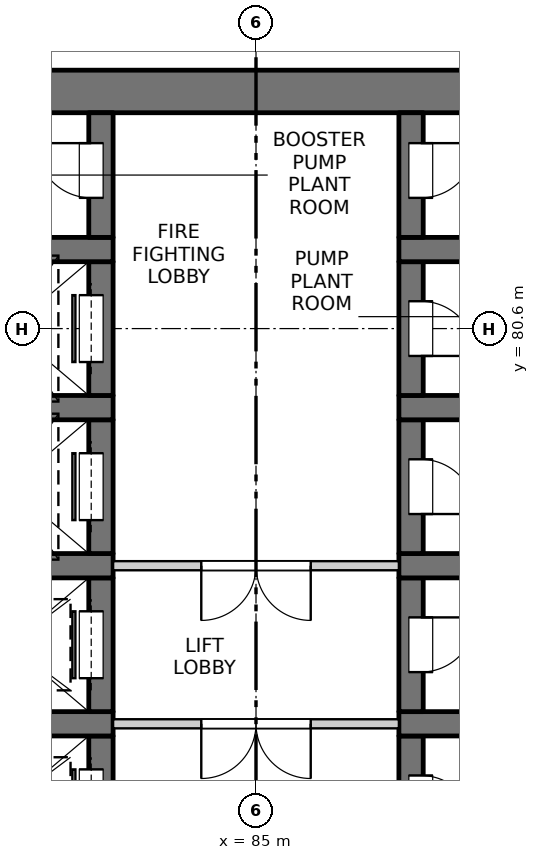
"""IFC4 building model, lengths in metres.
Left out: names, types, materials, properties, quantities, classifications, styles, units other than length and angle.
Written with IfcOpenShell. Run it as: python <this file> out.ifc"""

import sys

from ifc_helpers import new_model, si_unit, direction, frame, frame_2d, origin, place, context, subcontext, project, spatial, rectangle, extrude, element, fill, save


model = new_model("IFC4")
c1 = context("Model", 3, precision=1e-05, world=origin(), true_north=direction((0.0, 1.0)))
c2 = subcontext(c1, "Body", "Model", "MODEL_VIEW")
j1 = project(units=[si_unit("LENGTHUNIT", "METRE"), si_unit("PLANEANGLEUNIT", "RADIAN")], contexts=[c1])
p1 = place(None, origin())
s1 = spatial("IfcSite", under=j1, at=p1, CompositionType="ELEMENT")
p2 = place(p1, origin())
s2 = spatial("IfcBuilding", under=s1, at=p2, CompositionType="ELEMENT")
p3 = place(p2, frame((0.0, 0.0, 95.4)))
s3 = spatial("IfcBuildingStorey", under=s2, at=p3, CompositionType="ELEMENT", Elevation=95.4)
p4 = place(p3, frame((75.6, 84.5, -0.3), z_axis=(0.0, 0.0, 1.0), x_axis=(1.0, 0.0, 0.0)))
e1 = element("IfcWall", 1, at=p4, inside=s3, PredefinedType="SOLIDWALL", context=c2, shape_type="SweptSolid", body=[
    extrude(rectangle(XDim=18.8, YDim=0.7, at=frame_2d((9.4, 0.0))), origin(), (0.0, 0.0, 1.0), 4.5),
])
p5 = place(p3, frame((82.45, 71.7, -0.3), z_axis=(0.0, 0.0, 1.0), x_axis=(0.0, 1.0, 0.0)))
e2 = element("IfcWall", 2, at=p5, inside=s3, PredefinedType="SOLIDWALL", context=c2, shape_type="SweptSolid", body=[
    extrude(rectangle(XDim=2.2, YDim=0.4, at=frame_2d((1.1, 0.0))), origin(), (0.0, 0.0, 1.0), 4.5),
])
p6 = place(p5, frame((0.55, 0.0, 0.3)))
e3 = element("IfcOpeningElement", 3, at=p6, cuts=e2, PredefinedType="OPENING", context=c2, shape_type="SweptSolid", body=[
    extrude(rectangle(XDim=1.1, YDim=2.1, at=frame_2d((0.55, 1.05))), frame((0.0, 0.21, 0.0), z_axis=(0.0, -1.0, 0.0), x_axis=(1.0, 0.0, 0.0)), (0.0, 0.0, 1.0), 0.42),
])
p7 = place(p3, frame((79.65, 74.1, -0.3), z_axis=(0.0, 0.0, 1.0), x_axis=(1.0, 0.0, 0.0)))
e4 = element("IfcWall", 4, at=p7, inside=s3, PredefinedType="SOLIDWALL", context=c2, shape_type="SweptSolid", body=[
    extrude(rectangle(XDim=3.0, YDim=0.4, at=frame_2d((1.5, 0.0))), origin(), (0.0, 0.0, 1.0), 4.5),
])
p8 = place(p3, frame((82.45, 74.3, -0.3), z_axis=(0.0, 0.0, 1.0), x_axis=(0.0, 1.0, 0.0)))
e5 = element("IfcWall", 5, at=p8, inside=s3, PredefinedType="SOLIDWALL", context=c2, shape_type="SweptSolid", body=[
    extrude(rectangle(XDim=2.2, YDim=0.4, at=frame_2d((1.1, 0.0))), origin(), (0.0, 0.0, 1.0), 4.5),
])
p9 = place(p8, frame((0.55, 0.0, 0.3)))
e6 = element("IfcOpeningElement", 6, at=p9, cuts=e5, PredefinedType="OPENING", context=c2, shape_type="SweptSolid", body=[
    extrude(rectangle(XDim=1.1, YDim=2.1, at=frame_2d((0.55, 1.05))), frame((0.0, 0.21, 0.0), z_axis=(0.0, -1.0, 0.0), x_axis=(1.0, 0.0, 0.0)), (0.0, 0.0, 1.0), 0.42),
])
p10 = place(p3, frame((79.65, 76.7, -0.3), z_axis=(0.0, 0.0, 1.0), x_axis=(1.0, 0.0, 0.0)))
e7 = element("IfcWall", 7, at=p10, inside=s3, PredefinedType="SOLIDWALL", context=c2, shape_type="SweptSolid", body=[
    extrude(rectangle(XDim=3.0, YDim=0.4, at=frame_2d((1.5, 0.0))), origin(), (0.0, 0.0, 1.0), 4.5),
])
p11 = place(p3, frame((82.45, 76.9, -0.3), z_axis=(0.0, 0.0, 1.0), x_axis=(0.0, 1.0, 0.0)))
e8 = element("IfcWall", 8, at=p11, inside=s3, PredefinedType="SOLIDWALL", context=c2, shape_type="SweptSolid", body=[
    extrude(rectangle(XDim=2.2, YDim=0.4, at=frame_2d((1.1, 0.0))), origin(), (0.0, 0.0, 1.0), 4.5),
])
p12 = place(p11, frame((0.55, 0.0, 0.3)))
e9 = element("IfcOpeningElement", 9, at=p12, cuts=e8, PredefinedType="OPENING", context=c2, shape_type="SweptSolid", body=[
    extrude(rectangle(XDim=1.1, YDim=2.1, at=frame_2d((0.55, 1.05))), frame((0.0, 0.21, 0.0), z_axis=(0.0, -1.0, 0.0), x_axis=(1.0, 0.0, 0.0)), (0.0, 0.0, 1.0), 0.42),
])
p13 = place(p3, frame((79.65, 79.3, -0.3), z_axis=(0.0, 0.0, 1.0), x_axis=(1.0, 0.0, 0.0)))
e10 = element("IfcWall", 10, at=p13, inside=s3, PredefinedType="SOLIDWALL", context=c2, shape_type="SweptSolid", body=[
    extrude(rectangle(XDim=3.0, YDim=0.4, at=frame_2d((1.5, 0.0))), origin(), (0.0, 0.0, 1.0), 4.5),
])
p14 = place(p3, frame((82.45, 79.5, -0.3), z_axis=(0.0, 0.0, 1.0), x_axis=(0.0, 1.0, 0.0)))
e11 = element("IfcWall", 11, at=p14, inside=s3, PredefinedType="SOLIDWALL", context=c2, shape_type="SweptSolid", body=[
    extrude(rectangle(XDim=2.2, YDim=0.4, at=frame_2d((1.1, 0.0))), origin(), (0.0, 0.0, 1.0), 4.5),
])
p15 = place(p14, frame((0.55, 0.0, 0.3)))
e12 = element("IfcOpeningElement", 12, at=p15, cuts=e11, PredefinedType="OPENING", context=c2, shape_type="SweptSolid", body=[
    extrude(rectangle(XDim=1.1, YDim=2.1, at=frame_2d((0.55, 1.05))), frame((0.0, 0.21, 0.0), z_axis=(0.0, -1.0, 0.0), x_axis=(1.0, 0.0, 0.0)), (0.0, 0.0, 1.0), 0.42),
])
p16 = place(p3, frame((79.65, 81.9, -0.3), z_axis=(0.0, 0.0, 1.0), x_axis=(1.0, 0.0, 0.0)))
e13 = element("IfcWall", 13, at=p16, inside=s3, PredefinedType="SOLIDWALL", context=c2, shape_type="SweptSolid", body=[
    extrude(rectangle(XDim=3.0, YDim=0.4, at=frame_2d((1.5, 0.0))), origin(), (0.0, 0.0, 1.0), 4.5),
])
p17 = place(p3, frame((82.45, 82.1, -0.3), z_axis=(0.0, 0.0, 1.0), x_axis=(0.0, 1.0, 0.0)))
e14 = element("IfcWall", 14, at=p17, inside=s3, PredefinedType="SOLIDWALL", context=c2, shape_type="SweptSolid", body=[
    extrude(rectangle(XDim=2.05, YDim=0.4, at=frame_2d((1.025, 0.0))), origin(), (0.0, 0.0, 1.0), 4.5),
])
p18 = place(p17, frame((0.65, 0.0, 0.3)))
e15 = element("IfcOpeningElement", 15, at=p18, cuts=e14, PredefinedType="OPENING", context=c2, shape_type="SweptSolid", body=[
    extrude(rectangle(XDim=0.9, YDim=2.1, at=frame_2d((0.45, 1.05))), frame((0.0, 0.21, 0.0), z_axis=(0.0, -1.0, 0.0), x_axis=(1.0, 0.0, 0.0)), (0.0, 0.0, 1.0), 0.42),
])
p19 = place(p3, frame((87.55, 71.7, -0.3), z_axis=(0.0, 0.0, 1.0), x_axis=(0.0, 1.0, 0.0)))
e16 = element("IfcWall", 16, at=p19, inside=s3, PredefinedType="SOLIDWALL", context=c2, shape_type="SweptSolid", body=[
    extrude(rectangle(XDim=2.2, YDim=0.4, at=frame_2d((1.1, 0.0))), origin(), (0.0, 0.0, 1.0), 4.5),
])
p20 = place(p19, frame((0.65, 0.0, 0.3)))
e17 = element("IfcOpeningElement", 17, at=p20, cuts=e16, PredefinedType="OPENING", context=c2, shape_type="SweptSolid", body=[
    extrude(rectangle(XDim=0.9, YDim=2.1, at=frame_2d((0.45, 1.05))), frame((0.0, 0.21, 0.0), z_axis=(0.0, -1.0, 0.0), x_axis=(1.0, 0.0, 0.0)), (0.0, 0.0, 1.0), 0.42),
])
p21 = place(p3, frame((87.35, 74.1, -0.3), z_axis=(0.0, 0.0, 1.0), x_axis=(1.0, 0.0, 0.0)))
e18 = element("IfcWall", 18, at=p21, inside=s3, PredefinedType="SOLIDWALL", context=c2, shape_type="SweptSolid", body=[
    extrude(rectangle(XDim=3.0, YDim=0.4, at=frame_2d((1.5, 0.0))), origin(), (0.0, 0.0, 1.0), 4.5),
])
p22 = place(p3, frame((87.55, 74.3, -0.3), z_axis=(0.0, 0.0, 1.0), x_axis=(0.0, 1.0, 0.0)))
e19 = element("IfcWall", 19, at=p22, inside=s3, PredefinedType="SOLIDWALL", context=c2, shape_type="SweptSolid", body=[
    extrude(rectangle(XDim=2.2, YDim=0.4, at=frame_2d((1.1, 0.0))), origin(), (0.0, 0.0, 1.0), 4.5),
])
p23 = place(p22, frame((0.65, 0.0, 0.3)))
e20 = element("IfcOpeningElement", 20, at=p23, cuts=e19, PredefinedType="OPENING", context=c2, shape_type="SweptSolid", body=[
    extrude(rectangle(XDim=0.9, YDim=2.1, at=frame_2d((0.45, 1.05))), frame((0.0, 0.21, 0.0), z_axis=(0.0, -1.0, 0.0), x_axis=(1.0, 0.0, 0.0)), (0.0, 0.0, 1.0), 0.42),
])
p24 = place(p3, frame((87.35, 76.7, -0.3), z_axis=(0.0, 0.0, 1.0), x_axis=(1.0, 0.0, 0.0)))
e21 = element("IfcWall", 21, at=p24, inside=s3, PredefinedType="SOLIDWALL", context=c2, shape_type="SweptSolid", body=[
    extrude(rectangle(XDim=3.0, YDim=0.4, at=frame_2d((1.5, 0.0))), origin(), (0.0, 0.0, 1.0), 4.5),
])
p25 = place(p3, frame((87.55, 76.9, -0.3), z_axis=(0.0, 0.0, 1.0), x_axis=(0.0, 1.0, 0.0)))
e22 = element("IfcWall", 22, at=p25, inside=s3, PredefinedType="SOLIDWALL", context=c2, shape_type="SweptSolid", body=[
    extrude(rectangle(XDim=2.2, YDim=0.4, at=frame_2d((1.1, 0.0))), origin(), (0.0, 0.0, 1.0), 4.5),
])
p26 = place(p25, frame((0.65, 0.0, 0.3)))
e23 = element("IfcOpeningElement", 23, at=p26, cuts=e22, PredefinedType="OPENING", context=c2, shape_type="SweptSolid", body=[
    extrude(rectangle(XDim=0.9, YDim=2.1, at=frame_2d((0.45, 1.05))), frame((0.0, 0.21, 0.0), z_axis=(0.0, -1.0, 0.0), x_axis=(1.0, 0.0, 0.0)), (0.0, 0.0, 1.0), 0.42),
])
p27 = place(p3, frame((87.35, 79.3, -0.3), z_axis=(0.0, 0.0, 1.0), x_axis=(1.0, 0.0, 0.0)))
e24 = element("IfcWall", 24, at=p27, inside=s3, PredefinedType="SOLIDWALL", context=c2, shape_type="SweptSolid", body=[
    extrude(rectangle(XDim=3.0, YDim=0.4, at=frame_2d((1.5, 0.0))), origin(), (0.0, 0.0, 1.0), 4.5),
])
p28 = place(p3, frame((87.55, 79.5, -0.3), z_axis=(0.0, 0.0, 1.0), x_axis=(0.0, 1.0, 0.0)))
e25 = element("IfcWall", 25, at=p28, inside=s3, PredefinedType="SOLIDWALL", context=c2, shape_type="SweptSolid", body=[
    extrude(rectangle(XDim=2.2, YDim=0.4, at=frame_2d((1.1, 0.0))), origin(), (0.0, 0.0, 1.0), 4.5),
])
p29 = place(p28, frame((0.65, 0.0, 0.3)))
e26 = element("IfcOpeningElement", 26, at=p29, cuts=e25, PredefinedType="OPENING", context=c2, shape_type="SweptSolid", body=[
    extrude(rectangle(XDim=0.9, YDim=2.1, at=frame_2d((0.45, 1.05))), frame((0.0, 0.21, 0.0), z_axis=(0.0, -1.0, 0.0), x_axis=(1.0, 0.0, 0.0)), (0.0, 0.0, 1.0), 0.42),
])
p30 = place(p3, frame((87.35, 81.9, -0.3), z_axis=(0.0, 0.0, 1.0), x_axis=(1.0, 0.0, 0.0)))
e27 = element("IfcWall", 27, at=p30, inside=s3, PredefinedType="SOLIDWALL", context=c2, shape_type="SweptSolid", body=[
    extrude(rectangle(XDim=3.0, YDim=0.4, at=frame_2d((1.5, 0.0))), origin(), (0.0, 0.0, 1.0), 4.5),
])
p31 = place(p3, frame((87.55, 82.1, -0.3), z_axis=(0.0, 0.0, 1.0), x_axis=(0.0, 1.0, 0.0)))
e28 = element("IfcWall", 28, at=p31, inside=s3, PredefinedType="SOLIDWALL", context=c2, shape_type="SweptSolid", body=[
    extrude(rectangle(XDim=2.05, YDim=0.4, at=frame_2d((1.025, 0.0))), origin(), (0.0, 0.0, 1.0), 4.5),
])
p32 = place(p31, frame((0.65, 0.0, 0.3)))
e29 = element("IfcOpeningElement", 29, at=p32, cuts=e28, PredefinedType="OPENING", context=c2, shape_type="SweptSolid", body=[
    extrude(rectangle(XDim=0.9, YDim=2.1, at=frame_2d((0.45, 1.05))), frame((0.0, 0.21, 0.0), z_axis=(0.0, -1.0, 0.0), x_axis=(1.0, 0.0, 0.0)), (0.0, 0.0, 1.0), 0.42),
])
p33 = place(p3, frame((82.65, 74.1, 0.0), z_axis=(0.0, 0.0, 1.0), x_axis=(1.0, 0.0, 0.0)))
e30 = element("IfcWall", 30, at=p33, inside=s3, PredefinedType="PARTITIONING", context=c2, shape_type="SweptSolid", body=[
    extrude(rectangle(XDim=4.7, YDim=0.15, at=frame_2d((2.35, 0.0))), origin(), (0.0, 0.0, 1.0), 4.2),
])
p34 = place(p33, frame((1.45, 0.0, 0.0)))
e31 = element("IfcOpeningElement", 31, at=p34, cuts=e30, PredefinedType="OPENING", context=c2, shape_type="SweptSolid", body=[
    extrude(rectangle(XDim=1.8, YDim=2.1, at=frame_2d((0.9, 1.05))), frame((0.0, 0.085, 0.0), z_axis=(0.0, -1.0, 0.0), x_axis=(1.0, 0.0, 0.0)), (0.0, 0.0, 1.0), 0.17),
])
p35 = place(p3, frame((82.65, 76.7, 0.0), z_axis=(0.0, 0.0, 1.0), x_axis=(1.0, 0.0, 0.0)))
e32 = element("IfcWall", 32, at=p35, inside=s3, PredefinedType="PARTITIONING", context=c2, shape_type="SweptSolid", body=[
    extrude(rectangle(XDim=4.7, YDim=0.15, at=frame_2d((2.35, 0.0))), origin(), (0.0, 0.0, 1.0), 4.2),
])
p36 = place(p35, frame((1.45, 0.0, 0.0)))
e33 = element("IfcOpeningElement", 33, at=p36, cuts=e32, PredefinedType="OPENING", context=c2, shape_type="SweptSolid", body=[
    extrude(rectangle(XDim=1.8, YDim=2.1, at=frame_2d((0.9, 1.05))), frame((0.0, 0.085, 0.0), z_axis=(0.0, -1.0, 0.0), x_axis=(1.0, 0.0, 0.0)), (0.0, 0.0, 1.0), 0.17),
])
p37 = place(p6, origin())
e34 = element("IfcDoor", 34, at=p37, inside=s3, OperationType="SLIDING_TO_LEFT", PredefinedType="DOOR", context=c2, shape_type="SweptSolid", body=[
    extrude(rectangle(XDim=1.1, YDim=2.1, at=frame_2d((0.55, 1.05))), frame((0.0, 0.185, 0.0), z_axis=(0.0, -1.0, 0.0), x_axis=(1.0, 0.0, 0.0)), (0.0, 0.0, 1.0), 0.05),
])
fill(e3, e34)
p38 = place(p20, origin())
e35 = element("IfcDoor", 35, at=p38, inside=s3, OperationType="SINGLE_SWING_RIGHT", PredefinedType="DOOR", context=c2, shape_type="SweptSolid", body=[
    extrude(rectangle(XDim=0.9, YDim=2.1, at=frame_2d((0.45, 1.05))), frame((0.0, -0.135, 0.0), z_axis=(0.0, -1.0, 0.0), x_axis=(1.0, 0.0, 0.0)), (0.0, 0.0, 1.0), 0.05),
])
fill(e17, e35)
p39 = place(p34, origin())
e36 = element("IfcDoor", 36, at=p39, inside=s3, OperationType="DOUBLE_DOOR_SINGLE_SWING", PredefinedType="DOOR", context=c2, shape_type="SweptSolid", body=[
    extrude(rectangle(XDim=1.8, YDim=2.1, at=frame_2d((0.9, 1.05))), frame((0.0, 0.025, 0.0), z_axis=(0.0, -1.0, 0.0), x_axis=(1.0, 0.0, 0.0)), (0.0, 0.0, 1.0), 0.05),
])
fill(e31, e36)
p40 = place(p9, origin())
e37 = element("IfcDoor", 37, at=p40, inside=s3, OperationType="SLIDING_TO_LEFT", PredefinedType="DOOR", context=c2, shape_type="SweptSolid", body=[
    extrude(rectangle(XDim=1.1, YDim=2.1, at=frame_2d((0.55, 1.05))), frame((0.0, 0.185, 0.0), z_axis=(0.0, -1.0, 0.0), x_axis=(1.0, 0.0, 0.0)), (0.0, 0.0, 1.0), 0.05),
])
fill(e6, e37)
p41 = place(p23, origin())
e38 = element("IfcDoor", 38, at=p41, inside=s3, OperationType="SINGLE_SWING_LEFT", PredefinedType="DOOR", context=c2, shape_type="SweptSolid", body=[
    extrude(rectangle(XDim=0.9, YDim=2.1, at=frame_2d((0.45, 1.05))), frame((0.0, -0.135, 0.0), z_axis=(0.0, -1.0, 0.0), x_axis=(1.0, 0.0, 0.0)), (0.0, 0.0, 1.0), 0.05),
])
fill(e20, e38)
p42 = place(p36, origin())
e39 = element("IfcDoor", 39, at=p42, inside=s3, OperationType="DOUBLE_DOOR_SINGLE_SWING", PredefinedType="DOOR", context=c2, shape_type="SweptSolid", body=[
    extrude(rectangle(XDim=1.8, YDim=2.1, at=frame_2d((0.9, 1.05))), frame((0.0, 0.025, 0.0), z_axis=(0.0, -1.0, 0.0), x_axis=(1.0, 0.0, 0.0)), (0.0, 0.0, 1.0), 0.05),
])
fill(e33, e39)
p43 = place(p12, origin())
e40 = element("IfcDoor", 40, at=p43, inside=s3, OperationType="SLIDING_TO_LEFT", PredefinedType="DOOR", context=c2, shape_type="SweptSolid", body=[
    extrude(rectangle(XDim=1.1, YDim=2.1, at=frame_2d((0.55, 1.05))), frame((0.0, 0.185, 0.0), z_axis=(0.0, -1.0, 0.0), x_axis=(1.0, 0.0, 0.0)), (0.0, 0.0, 1.0), 0.05),
])
fill(e9, e40)
p44 = place(p26, origin())
e41 = element("IfcDoor", 41, at=p44, inside=s3, OperationType="SINGLE_SWING_RIGHT", PredefinedType="DOOR", context=c2, shape_type="SweptSolid", body=[
    extrude(rectangle(XDim=0.9, YDim=2.1, at=frame_2d((0.45, 1.05))), frame((0.0, -0.135, 0.0), z_axis=(0.0, -1.0, 0.0), x_axis=(1.0, 0.0, 0.0)), (0.0, 0.0, 1.0), 0.05),
])
fill(e23, e41)
p45 = place(p15, origin())
e42 = element("IfcDoor", 42, at=p45, inside=s3, OperationType="SLIDING_TO_LEFT", PredefinedType="DOOR", context=c2, shape_type="SweptSolid", body=[
    extrude(rectangle(XDim=1.1, YDim=2.1, at=frame_2d((0.55, 1.05))), frame((0.0, 0.185, 0.0), z_axis=(0.0, -1.0, 0.0), x_axis=(1.0, 0.0, 0.0)), (0.0, 0.0, 1.0), 0.05),
])
fill(e12, e42)
p46 = place(p29, origin())
e43 = element("IfcDoor", 43, at=p46, inside=s3, OperationType="SINGLE_SWING_RIGHT", PredefinedType="DOOR", context=c2, shape_type="SweptSolid", body=[
    extrude(rectangle(XDim=0.9, YDim=2.1, at=frame_2d((0.45, 1.05))), frame((0.0, -0.135, 0.0), z_axis=(0.0, -1.0, 0.0), x_axis=(1.0, 0.0, 0.0)), (0.0, 0.0, 1.0), 0.05),
])
fill(e26, e43)
p47 = place(p18, origin())
e44 = element("IfcDoor", 44, at=p47, inside=s3, OperationType="SINGLE_SWING_RIGHT", PredefinedType="DOOR", context=c2, shape_type="SweptSolid", body=[
    extrude(rectangle(XDim=0.9, YDim=2.1, at=frame_2d((0.45, 1.05))), frame((0.0, 0.185, 0.0), z_axis=(0.0, -1.0, 0.0), x_axis=(1.0, 0.0, 0.0)), (0.0, 0.0, 1.0), 0.05),
])
fill(e15, e44)
p48 = place(p32, origin())
e45 = element("IfcDoor", 45, at=p48, inside=s3, OperationType="SINGLE_SWING_LEFT", PredefinedType="DOOR", context=c2, shape_type="SweptSolid", body=[
    extrude(rectangle(XDim=0.9, YDim=2.1, at=frame_2d((0.45, 1.05))), frame((0.0, -0.135, 0.0), z_axis=(0.0, -1.0, 0.0), x_axis=(1.0, 0.0, 0.0)), (0.0, 0.0, 1.0), 0.05),
])
fill(e29, e45)
save(model, sys.argv[1])
